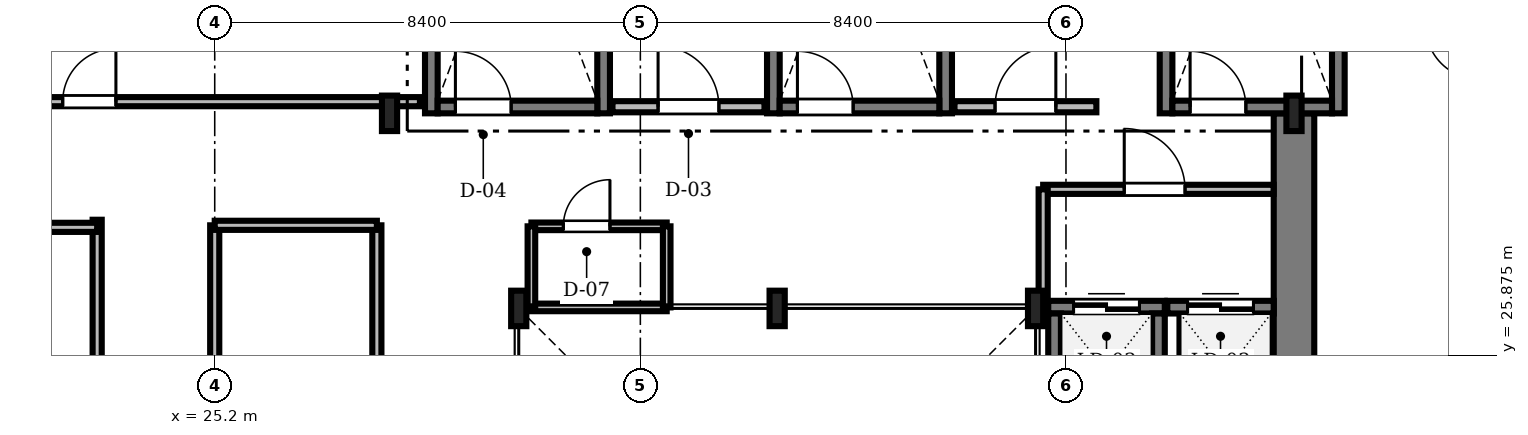
"""IFC4 building model, lengths in metres.
Left out: names, types, materials, properties, quantities, classifications, styles, units other than length and angle.
Written with IfcOpenShell. Run it as: python <this file> out.ifc"""

import sys

from ifc_helpers import new_model, si_unit, direction, frame, frame_2d, origin, origin_2d, place, context, subcontext, project, spatial, rectangle, i_section, extrude, source, transform, mapped, element, fill, save


model = new_model("IFC4")
c1 = context("Model", 3, precision=1e-05, world=origin(), true_north=direction((0.0, 1.0)))
c2 = subcontext(c1, "Body", "Model", "MODEL_VIEW")
j1 = project(units=[si_unit("LENGTHUNIT", "METRE"), si_unit("PLANEANGLEUNIT", "RADIAN")], contexts=[c1])
p1 = place(None, origin())
s1 = spatial("IfcSite", under=j1, at=p1, CompositionType="ELEMENT")
p2 = place(p1, origin())
s2 = spatial("IfcBuilding", under=s1, at=p2, CompositionType="ELEMENT")
p3 = place(p2, frame((0.0, 0.0, 226.05)))
s3 = spatial("IfcBuildingStorey", under=s2, at=p3, CompositionType="ELEMENT", Elevation=226.05)
m1 = source(origin(), c2, "Body", "SweptSolid", [
    extrude(rectangle(XDim=13.15, YDim=0.8, at=frame_2d((6.575, 0.0))), origin(), (0.0, 0.0, 1.0), 3.53),
])
p4 = place(p3, frame((46.5, 17.5, 0.0), z_axis=(0.0, 0.0, 1.0), x_axis=(0.0, 1.0, 0.0)))
e1 = element("IfcWall", 1, at=p4, inside=s3, PredefinedType="SHEAR", context=c2, shape_type="MappedRepresentation", body=[
    mapped(m1, transform((0.0, 0.0, 0.0), scale=1.0)),
])
m2 = source(origin(), c2, "Body", "SweptSolid", [
    extrude(i_section(OverallWidth=0.3, OverallDepth=0.7, WebThickness=0.017, FlangeThickness=0.032, FilletRadius=0.027, at=origin_2d()), origin(), (0.0, 0.0, 1.0), 3.53),
])
for number, where, z_axis, x_axis in (
    (2, (41.4, 26.8, 0.0), (0.0, 0.0, 1.0), (1.0, 0.0, 0.0)),
    (3, (36.3, 26.8, 0.0), (0.0, 0.0, 1.0), (1.0, 0.0, 0.0)),
    (4, (31.2, 26.8, 0.0), (0.0, 0.0, 1.0), (1.0, 0.0, 0.0)),
    (5, (28.65, 30.65, 0.0), (0.0, 0.0, 1.0), (1.0, 0.0, 0.0)),
    (6, (46.5, 30.65, 0.0), (0.0, 0.0, 1.0), (1.0, 0.0, 0.0)),
):
    element("IfcColumn", number, at=place(p3, frame(where, z_axis=z_axis, x_axis=x_axis)), inside=s3, PredefinedType="COLUMN", context=c2, shape_type="MappedRepresentation", body=[
        mapped(m2, transform((0.0, 0.0, 0.0), scale=1.0)),
    ])
m3 = source(origin(), c2, "Body", "SweptSolid", [
    extrude(rectangle(XDim=9.25, YDim=0.25, at=frame_2d((4.625, 0.0))), origin(), (0.0, 0.0, 1.0), 3.55),
])
for number, where, z_axis, x_axis in (
    (7, (29.475, 30.65, 0.0), (0.0, 0.0, 1.0), (0.0, 1.0, 0.0)),
    (8, (32.875, 30.65, 0.0), (0.0, 0.0, 1.0), (0.0, 1.0, 0.0)),
):
    element("IfcWall", number, at=place(p3, frame(where, z_axis=z_axis, x_axis=x_axis)), inside=s3, PredefinedType="SOLIDWALL", context=c2, shape_type="MappedRepresentation", body=[
        mapped(m3, transform((0.0, 0.0, 0.0), scale=1.0)),
    ])
m4 = source(origin(), c2, "Body", "SweptSolid", [
    extrude(rectangle(XDim=3.15, YDim=0.25, at=frame_2d((1.575, 0.0))), origin(), (0.0, 0.0, 1.0), 3.55),
])
p5 = place(p3, frame((29.6, 30.775, 0.0), z_axis=(0.0, 0.0, 1.0), x_axis=(1.0, 0.0, 0.0)))
e9 = element("IfcWall", 9, at=p5, inside=s3, PredefinedType="SOLIDWALL", context=c2, shape_type="MappedRepresentation", body=[
    mapped(m4, transform((0.0, 0.0, 0.0), scale=1.0)),
])
m5 = source(origin(), c2, "Body", "SweptSolid", [
    extrude(rectangle(XDim=1.1, YDim=2.2, at=frame_2d((0.55, 1.1))), frame((0.0, 0.135, 0.0), z_axis=(0.0, -1.0, 0.0), x_axis=(1.0, 0.0, 0.0)), (0.0, 0.0, 1.0), 0.27),
])
p6 = place(p5, frame((0.35, 0.0, 0.0)))
e10 = element("IfcOpeningElement", 10, at=p6, cuts=e9, PredefinedType="OPENING", context=c2, shape_type="MappedRepresentation", body=[
    mapped(m5, transform((0.0, 0.0, 0.0), scale=1.0)),
])
for number, where, z_axis, x_axis in (
    (11, (36.225, 30.65, 0.0), (0.0, 0.0, 1.0), (0.0, 1.0, 0.0)),
    (12, (39.625, 30.65, 0.0), (0.0, 0.0, 1.0), (0.0, 1.0, 0.0)),
):
    element("IfcWall", number, at=place(p3, frame(where, z_axis=z_axis, x_axis=x_axis)), inside=s3, PredefinedType="SOLIDWALL", context=c2, shape_type="MappedRepresentation", body=[
        mapped(m3, transform((0.0, 0.0, 0.0), scale=1.0)),
    ])
p7 = place(p3, frame((36.35, 30.775, 0.0), z_axis=(0.0, 0.0, 1.0), x_axis=(1.0, 0.0, 0.0)))
e13 = element("IfcWall", 13, at=p7, inside=s3, PredefinedType="SOLIDWALL", context=c2, shape_type="MappedRepresentation", body=[
    mapped(m4, transform((0.0, 0.0, 0.0), scale=1.0)),
])
p8 = place(p7, frame((0.35, 0.0, 0.0)))
e14 = element("IfcOpeningElement", 14, at=p8, cuts=e13, PredefinedType="OPENING", context=c2, shape_type="MappedRepresentation", body=[
    mapped(m5, transform((0.0, 0.0, 0.0), scale=1.0)),
])
for number, where, z_axis, x_axis in (
    (15, (43.975, 30.65, 0.0), (0.0, 0.0, 1.0), (0.0, 1.0, 0.0)),
    (16, (47.375, 30.65, 0.0), (0.0, 0.0, 1.0), (0.0, 1.0, 0.0)),
):
    element("IfcWall", number, at=place(p3, frame(where, z_axis=z_axis, x_axis=x_axis)), inside=s3, PredefinedType="SOLIDWALL", context=c2, shape_type="MappedRepresentation", body=[
        mapped(m3, transform((0.0, 0.0, 0.0), scale=1.0)),
    ])
p9 = place(p3, frame((44.1, 30.775, 0.0), z_axis=(0.0, 0.0, 1.0), x_axis=(1.0, 0.0, 0.0)))
e17 = element("IfcWall", 17, at=p9, inside=s3, PredefinedType="SOLIDWALL", context=c2, shape_type="MappedRepresentation", body=[
    mapped(m4, transform((0.0, 0.0, 0.0), scale=1.0)),
])
p10 = place(p9, frame((0.35, 0.0, 0.0)))
e18 = element("IfcOpeningElement", 18, at=p10, cuts=e17, PredefinedType="OPENING", context=c2, shape_type="MappedRepresentation", body=[
    mapped(m5, transform((0.0, 0.0, 0.0), scale=1.0)),
])
m6 = source(origin(), c2, "Body", "SweptSolid", [
    extrude(rectangle(XDim=3.0, YDim=0.22, at=frame_2d((1.5, 0.0))), origin(), (0.0, 0.0, 1.0), 3.53),
])
p11 = place(p3, frame((33.05, 30.78, 0.0), z_axis=(0.0, 0.0, 1.0), x_axis=(1.0, 0.0, 0.0)))
e19 = element("IfcWall", 19, at=p11, inside=s3, PredefinedType="SOLIDWALL", context=c2, shape_type="MappedRepresentation", body=[
    mapped(m6, transform((0.0, 0.0, 0.0), scale=1.0)),
])
m7 = source(origin(), c2, "Body", "SweptSolid", [
    extrude(rectangle(XDim=1.2, YDim=2.2, at=frame_2d((0.6, 1.1))), frame((0.0, 0.12, 0.0), z_axis=(0.0, -1.0, 0.0), x_axis=(1.0, 0.0, 0.0)), (0.0, 0.0, 1.0), 0.24),
])
p12 = place(p11, frame((0.9, 0.0, 0.0)))
e20 = element("IfcOpeningElement", 20, at=p12, cuts=e19, PredefinedType="OPENING", context=c2, shape_type="MappedRepresentation", body=[
    mapped(m7, transform((0.0, 0.0, 0.0), scale=1.0)),
])
m8 = source(origin(), c2, "Body", "SweptSolid", [
    extrude(rectangle(XDim=2.8, YDim=0.22, at=frame_2d((1.4, 0.0))), origin(), (0.0, 0.0, 1.0), 3.53),
])
p13 = place(p3, frame((39.8, 30.78, 0.0), z_axis=(0.0, 0.0, 1.0), x_axis=(1.0, 0.0, 0.0)))
e21 = element("IfcWall", 21, at=p13, inside=s3, PredefinedType="SOLIDWALL", context=c2, shape_type="MappedRepresentation", body=[
    mapped(m8, transform((0.0, 0.0, 0.0), scale=1.0)),
])
p14 = place(p13, frame((0.8, 0.0, 0.0)))
e22 = element("IfcOpeningElement", 22, at=p14, cuts=e21, PredefinedType="OPENING", context=c2, shape_type="MappedRepresentation", body=[
    mapped(m7, transform((0.0, 0.0, 0.0), scale=1.0)),
])
m9 = source(origin(), c2, "Body", "SweptSolid", [
    extrude(rectangle(XDim=2.3, YDim=0.25, at=frame_2d((1.15, 0.0))), origin(), (0.0, 0.0, 1.0), 3.53),
])
p15 = place(p3, frame((41.65, 26.825, 0.0), z_axis=(0.0, 0.0, 1.0), x_axis=(1.0, 0.0, 0.0)))
e23 = element("IfcWall", 23, at=p15, inside=s3, PredefinedType="SOLIDWALL", context=c2, shape_type="MappedRepresentation", body=[
    mapped(m9, transform((0.0, 0.0, 0.0), scale=1.0)),
])
m10 = source(origin(), c2, "Body", "SweptSolid", [
    extrude(rectangle(XDim=1.3, YDim=2.3, at=frame_2d((0.65, 1.15))), frame((0.0, 0.135, 0.0), z_axis=(0.0, -1.0, 0.0), x_axis=(1.0, 0.0, 0.0)), (0.0, 0.0, 1.0), 0.27),
])
p16 = place(p15, frame((0.5, 0.0, 0.0)))
e24 = element("IfcOpeningElement", 24, at=p16, cuts=e23, PredefinedType="OPENING", context=c2, shape_type="MappedRepresentation", body=[
    mapped(m10, transform((0.0, 0.0, 0.0), scale=1.0)),
])
for number, where, z_axis, x_axis in (
    (25, (41.775, 24.4, 0.0), (0.0, 0.0, 1.0), (0.0, 1.0, 0.0)),
    (26, (43.825, 24.4, 0.0), (0.0, 0.0, 1.0), (0.0, 1.0, 0.0)),
):
    element("IfcWall", number, at=place(p3, frame(where, z_axis=z_axis, x_axis=x_axis)), inside=s3, PredefinedType="SOLIDWALL", context=c2, shape_type="MappedRepresentation", body=[
        mapped(m9, transform((0.0, 0.0, 0.0), scale=1.0)),
    ])
m11 = source(origin(), c2, "Body", "SweptSolid", [
    extrude(rectangle(XDim=2.1, YDim=0.25, at=frame_2d((1.05, 0.0))), origin(), (0.0, 0.0, 1.0), 3.53),
])
p17 = place(p3, frame((44.0, 26.825, 0.0), z_axis=(0.0, 0.0, 1.0), x_axis=(1.0, 0.0, 0.0)))
e27 = element("IfcWall", 27, at=p17, inside=s3, PredefinedType="SOLIDWALL", context=c2, shape_type="MappedRepresentation", body=[
    mapped(m11, transform((0.0, 0.0, 0.0), scale=1.0)),
])
p18 = place(p17, frame((0.4, 0.0, 0.0)))
e28 = element("IfcOpeningElement", 28, at=p18, cuts=e27, PredefinedType="OPENING", context=c2, shape_type="MappedRepresentation", body=[
    mapped(m10, transform((0.0, 0.0, 0.0), scale=1.0)),
])
m12 = source(origin(), c2, "Body", "SweptSolid", [
    extrude(rectangle(XDim=17.828, YDim=0.18, at=frame_2d((8.914, 0.0))), origin(), (0.0, 0.0, 1.0), 2.772),
])
p19 = place(p3, frame((11.422, 30.88, 0.0), z_axis=(0.0, 0.0, 1.0), x_axis=(1.0, 0.0, 0.0)))
e29 = element("IfcWall", 29, at=p19, inside=s3, PredefinedType="PARTITIONING", context=c2, shape_type="MappedRepresentation", body=[
    mapped(m12, transform((0.0, 0.0, 0.0), scale=1.0)),
])
m13 = source(origin(), c2, "Body", "SweptSolid", [
    extrude(rectangle(XDim=1.05, YDim=2.2, at=frame_2d((0.525, 1.1))), frame((0.0, 0.1, 0.0), z_axis=(0.0, -1.0, 0.0), x_axis=(1.0, 0.0, 0.0)), (0.0, 0.0, 1.0), 0.2),
])
p20 = place(p19, frame((10.778, 0.0, 0.0)))
e30 = element("IfcOpeningElement", 30, at=p20, cuts=e29, PredefinedType="OPENING", context=c2, shape_type="MappedRepresentation", body=[
    mapped(m13, transform((0.0, 0.0, 0.0), scale=1.0)),
])
m14 = source(origin(), c2, "Body", "SweptSolid", [
    extrude(rectangle(XDim=6.54, YDim=0.18, at=frame_2d((3.27, 0.0))), origin(), (0.0, 0.0, 1.0), 2.972),
])
p21 = place(p3, frame((25.2, 21.9, 0.0), z_axis=(0.0, 0.0, 1.0), x_axis=(0.0, 1.0, 0.0)))
e31 = element("IfcWall", 31, at=p21, inside=s3, PredefinedType="PARTITIONING", context=c2, shape_type="MappedRepresentation", body=[
    mapped(m14, transform((0.0, 0.0, 0.0), scale=1.0)),
])
p22 = place(p21, frame((2.2, 0.0, 0.0)))
e32 = element("IfcOpeningElement", 32, at=p22, cuts=e31, PredefinedType="OPENING", context=c2, shape_type="MappedRepresentation", body=[
    mapped(m13, transform((0.0, 0.0, 0.0), scale=1.0)),
])
m15 = source(origin(), c2, "Body", "SweptSolid", [
    extrude(rectangle(XDim=4.548, YDim=0.18, at=frame_2d((2.274, 0.0))), origin(), (0.0, 0.0, 1.0), 3.162),
])
p23 = place(p3, frame((41.55, 29.15, 0.0), z_axis=(0.0, 0.0, 1.0), x_axis=(1.0, 0.0, 0.0)))
e33 = element("IfcWall", 33, at=p23, inside=s3, PredefinedType="PARTITIONING", context=c2, shape_type="MappedRepresentation", body=[
    mapped(m15, transform((0.0, 0.0, 0.0), scale=1.0)),
])
m16 = source(origin(), c2, "Body", "SweptSolid", [
    extrude(rectangle(XDim=1.2, YDim=2.2, at=frame_2d((0.6, 1.1))), frame((0.0, 0.1, 0.0), z_axis=(0.0, -1.0, 0.0), x_axis=(1.0, 0.0, 0.0)), (0.0, 0.0, 1.0), 0.2),
])
p24 = place(p23, frame((1.6, 0.0, 0.0)))
e34 = element("IfcOpeningElement", 34, at=p24, cuts=e33, PredefinedType="OPENING", context=c2, shape_type="MappedRepresentation", body=[
    mapped(m16, transform((0.0, 0.0, 0.0), scale=1.0)),
])
m17 = source(origin(), c2, "Body", "SweptSolid", [
    extrude(rectangle(XDim=2.67, YDim=0.15, at=frame_2d((1.335, 0.0))), origin(), (0.0, 0.0, 1.0), 3.162),
])
p25 = place(p3, frame((31.45, 28.42, 0.0), z_axis=(0.0, 0.0, 1.0), x_axis=(1.0, 0.0, 0.0)))
e35 = element("IfcWall", 35, at=p25, inside=s3, PredefinedType="PARTITIONING", context=c2, shape_type="MappedRepresentation", body=[
    mapped(m17, transform((0.0, 0.0, 0.0), scale=1.0)),
])
m18 = source(origin(), c2, "Body", "SweptSolid", [
    extrude(rectangle(XDim=0.92, YDim=2.1, at=frame_2d((0.46, 1.05))), frame((0.0, 0.085, 0.0), z_axis=(0.0, -1.0, 0.0), x_axis=(1.0, 0.0, 0.0)), (0.0, 0.0, 1.0), 0.17),
])
p26 = place(p25, frame((0.63, 0.0, 0.0)))
e36 = element("IfcOpeningElement", 36, at=p26, cuts=e35, PredefinedType="OPENING", context=c2, shape_type="MappedRepresentation", body=[
    mapped(m18, transform((0.0, 0.0, 0.0), scale=1.0)),
])
m19 = source(origin(), c2, "Body", "SweptSolid", [
    extrude(rectangle(XDim=14.92, YDim=0.18, at=frame_2d((7.46, 0.0))), origin(), (0.0, 0.0, 1.0), 2.972),
])
p27 = place(p3, frame((22.88, 13.63, 0.0), z_axis=(0.0, 0.0, 1.0), x_axis=(0.0, 1.0, 0.0)))
e37 = element("IfcWall", 37, at=p27, inside=s3, PredefinedType="PARTITIONING", context=c2, shape_type="MappedRepresentation", body=[
    mapped(m19, transform((0.0, 0.0, 0.0), scale=1.0)),
])
m20 = source(origin(), c2, "Body", "SweptSolid", [
    extrude(rectangle(XDim=11.65, YDim=0.18, at=frame_2d((5.825, 0.0))), origin(), (0.0, 0.0, 1.0), 2.772),
])
p28 = place(p3, frame((11.23, 28.4, 0.0), z_axis=(0.0, 0.0, 1.0), x_axis=(1.0, 0.0, 0.0)))
e38 = element("IfcWall", 38, at=p28, inside=s3, PredefinedType="PARTITIONING", context=c2, shape_type="MappedRepresentation", body=[
    mapped(m20, transform((0.0, 0.0, 0.0), scale=1.0)),
])
p29 = place(p3, frame((28.4, 21.9, 0.0), z_axis=(0.0, 0.0, 1.0), x_axis=(0.0, 1.0, 0.0)))
e39 = element("IfcWall", 39, at=p29, inside=s3, PredefinedType="PARTITIONING", context=c2, shape_type="MappedRepresentation", body=[
    mapped(m14, transform((0.0, 0.0, 0.0), scale=1.0)),
])
m21 = source(origin(), c2, "Body", "SweptSolid", [
    extrude(rectangle(XDim=3.2, YDim=0.18, at=frame_2d((1.6, 0.0))), origin(), (0.0, 0.0, 1.0), 3.53),
])
p30 = place(p3, frame((25.2, 28.44, 0.0), z_axis=(0.0, 0.0, 1.0), x_axis=(1.0, 0.0, 0.0)))
e40 = element("IfcWall", 40, at=p30, inside=s3, PredefinedType="PARTITIONING", context=c2, shape_type="MappedRepresentation", body=[
    mapped(m21, transform((0.0, 0.0, 0.0), scale=1.0)),
])
m22 = source(origin(), c2, "Body", "SweptSolid", [
    extrude(rectangle(XDim=2.67, YDim=0.15, at=frame_2d((1.335, 0.0))), origin(), (0.0, 0.0, 1.0), 3.072),
])
p31 = place(p3, frame((31.45, 26.82, 0.0), z_axis=(0.0, 0.0, 1.0), x_axis=(1.0, 0.0, 0.0)))
e41 = element("IfcWall", 41, at=p31, inside=s3, PredefinedType="PARTITIONING", context=c2, shape_type="MappedRepresentation", body=[
    mapped(m22, transform((0.0, 0.0, 0.0), scale=1.0)),
])
m23 = source(origin(), c2, "Body", "SweptSolid", [
    extrude(rectangle(XDim=2.35, YDim=0.18, at=frame_2d((1.175, 0.0))), origin(), (0.0, 0.0, 1.0), 2.972),
])
p32 = place(p3, frame((41.55, 26.8, 0.0), z_axis=(0.0, 0.0, 1.0), x_axis=(0.0, 1.0, 0.0)))
e42 = element("IfcWall", 42, at=p32, inside=s3, PredefinedType="PARTITIONING", context=c2, shape_type="MappedRepresentation", body=[
    mapped(m23, transform((0.0, 0.0, 0.0), scale=1.0)),
])
m24 = source(origin(), c2, "Body", "SweptSolid", [
    extrude(rectangle(XDim=1.6, YDim=0.15, at=frame_2d((0.8, 0.0))), origin(), (0.0, 0.0, 1.0), 3.072),
])
for number, where, z_axis, x_axis in (
    (43, (31.45, 26.82, 0.0), (0.0, 0.0, 1.0), (0.0, 1.0, 0.0)),
    (44, (34.12, 26.82, 0.0), (0.0, 0.0, 1.0), (0.0, 1.0, 0.0)),
):
    element("IfcWall", number, at=place(p3, frame(where, z_axis=z_axis, x_axis=x_axis)), inside=s3, PredefinedType="PARTITIONING", context=c2, shape_type="MappedRepresentation", body=[
        mapped(m24, transform((0.0, 0.0, 0.0), scale=1.0)),
    ])
m25 = source(origin(), c2, "Body", "SweptSolid", [
    extrude(rectangle(XDim=1.1, YDim=2.2, at=frame_2d((0.55, 1.1))), frame((0.0, 0.025, 0.0), z_axis=(0.0, -1.0, 0.0), x_axis=(1.0, 0.0, 0.0)), (0.0, 0.0, 1.0), 0.05),
])
p33 = place(p6, origin())
e45 = element("IfcDoor", 45, at=p33, inside=s3, OperationType="SINGLE_SWING_LEFT", PredefinedType="DOOR", context=c2, shape_type="MappedRepresentation", body=[
    mapped(m25, transform((0.0, 0.0, 0.0), scale=1.0)),
])
fill(e10, e45)
p34 = place(p8, origin())
e46 = element("IfcDoor", 46, at=p34, inside=s3, OperationType="SINGLE_SWING_LEFT", PredefinedType="DOOR", context=c2, shape_type="MappedRepresentation", body=[
    mapped(m25, transform((0.0, 0.0, 0.0), scale=1.0)),
])
fill(e14, e46)
p35 = place(p10, origin())
e47 = element("IfcDoor", 47, at=p35, inside=s3, OperationType="SINGLE_SWING_LEFT", PredefinedType="DOOR", context=c2, shape_type="MappedRepresentation", body=[
    mapped(m25, transform((0.0, 0.0, 0.0), scale=1.0)),
])
fill(e18, e47)
m26 = source(origin(), c2, "Body", "SweptSolid", [
    extrude(rectangle(XDim=1.2, YDim=2.2, at=frame_2d((0.6, 1.1))), frame((0.0, 0.025, 0.0), z_axis=(0.0, -1.0, 0.0), x_axis=(1.0, 0.0, 0.0)), (0.0, 0.0, 1.0), 0.05),
])
p36 = place(p12, origin())
e48 = element("IfcDoor", 48, at=p36, inside=s3, OperationType="SINGLE_SWING_LEFT", PredefinedType="DOOR", context=c2, shape_type="MappedRepresentation", body=[
    mapped(m26, transform((0.0, 0.0, 0.0), scale=1.0)),
])
fill(e20, e48)
p37 = place(p14, origin())
e49 = element("IfcDoor", 49, at=p37, inside=s3, OperationType="SINGLE_SWING_RIGHT", PredefinedType="DOOR", context=c2, shape_type="MappedRepresentation", body=[
    mapped(m26, transform((0.0, 0.0, 0.0), scale=1.0)),
])
fill(e22, e49)
m27 = source(origin(), c2, "Body", "SweptSolid", [
    extrude(rectangle(XDim=1.3, YDim=2.3, at=frame_2d((0.65, 1.15))), frame((0.0, 0.025, 0.0), z_axis=(0.0, -1.0, 0.0), x_axis=(1.0, 0.0, 0.0)), (0.0, 0.0, 1.0), 0.05),
])
p38 = place(p16, origin())
e50 = element("IfcDoor", 50, at=p38, inside=s3, OperationType="DOUBLE_DOOR_SLIDING", PredefinedType="DOOR", context=c2, shape_type="MappedRepresentation", body=[
    mapped(m27, transform((0.0, 0.0, 0.0), scale=1.0)),
])
fill(e24, e50)
p39 = place(p18, origin())
e51 = element("IfcDoor", 51, at=p39, inside=s3, OperationType="DOUBLE_DOOR_SLIDING", PredefinedType="DOOR", context=c2, shape_type="MappedRepresentation", body=[
    mapped(m27, transform((0.0, 0.0, 0.0), scale=1.0)),
])
fill(e28, e51)
m28 = source(origin(), c2, "Body", "SweptSolid", [
    extrude(rectangle(XDim=1.05, YDim=2.2, at=frame_2d((0.525, 1.1))), frame((0.0, 0.025, 0.0), z_axis=(0.0, -1.0, 0.0), x_axis=(1.0, 0.0, 0.0)), (0.0, 0.0, 1.0), 0.05),
])
p40 = place(p20, origin())
e52 = element("IfcDoor", 52, at=p40, inside=s3, OperationType="SINGLE_SWING_RIGHT", PredefinedType="DOOR", context=c2, shape_type="MappedRepresentation", body=[
    mapped(m28, transform((0.0, 0.0, 0.0), scale=1.0)),
])
fill(e30, e52)
p41 = place(p24, origin())
e53 = element("IfcDoor", 53, at=p41, inside=s3, OperationType="SINGLE_SWING_LEFT", PredefinedType="DOOR", context=c2, shape_type="MappedRepresentation", body=[
    mapped(m26, transform((0.0, 0.0, 0.0), scale=1.0)),
])
fill(e34, e53)
m29 = source(origin(), c2, "Body", "SweptSolid", [
    extrude(rectangle(XDim=0.92, YDim=2.1, at=frame_2d((0.46, 1.05))), frame((0.0, 0.025, 0.0), z_axis=(0.0, -1.0, 0.0), x_axis=(1.0, 0.0, 0.0)), (0.0, 0.0, 1.0), 0.05),
])
p42 = place(p26, origin())
e54 = element("IfcDoor", 54, at=p42, inside=s3, OperationType="SINGLE_SWING_RIGHT", PredefinedType="DOOR", context=c2, shape_type="MappedRepresentation", body=[
    mapped(m29, transform((0.0, 0.0, 0.0), scale=1.0)),
])
fill(e36, e54)
save(model, sys.argv[1])
